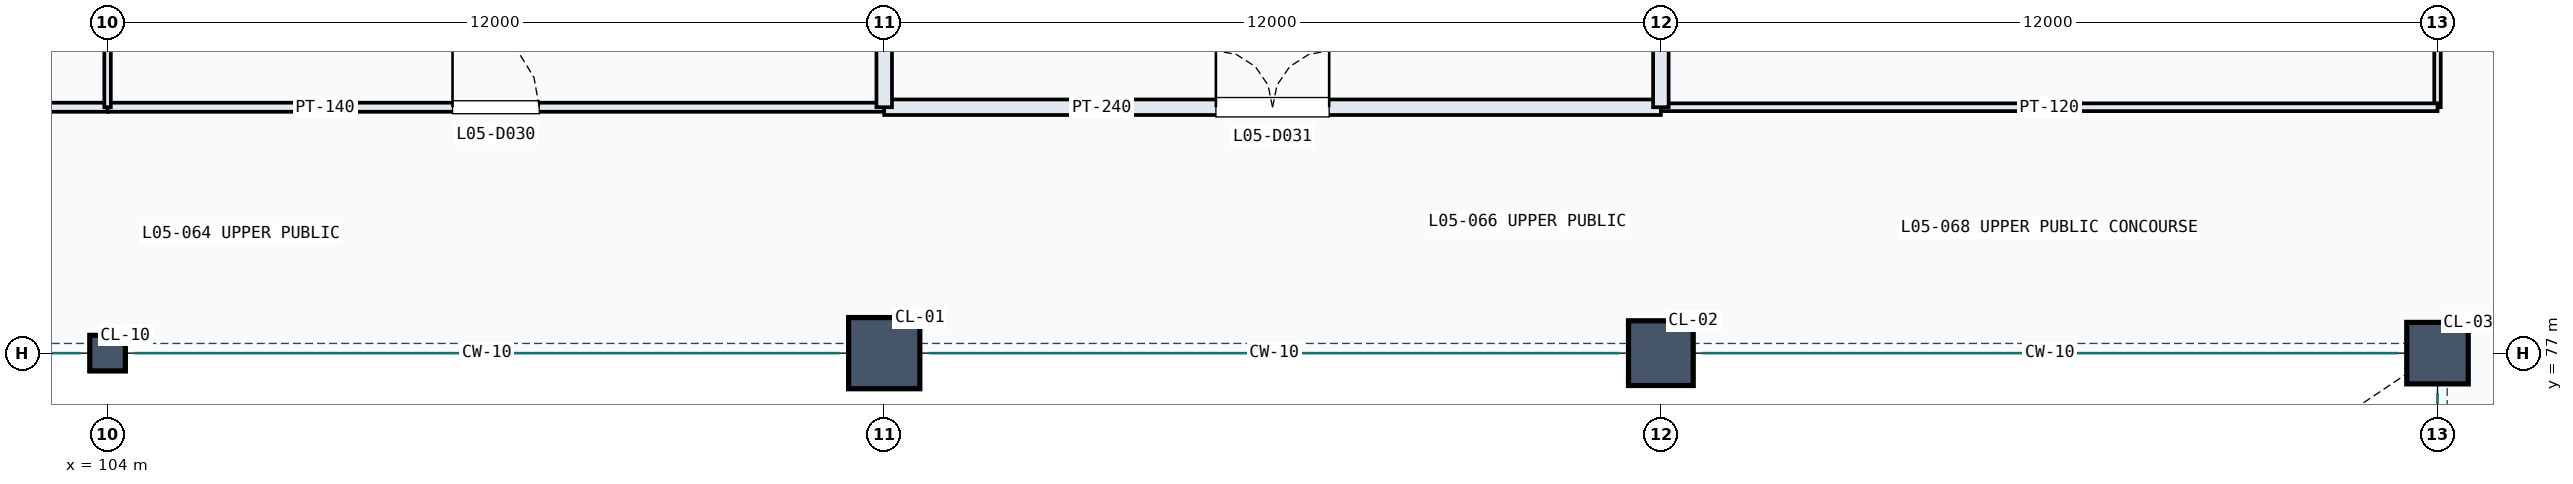
"""IFC4 building model, lengths in metres.
Left out: names, types, materials, properties, quantities, classifications, styles, units other than length and angle.
Written with IfcOpenShell. Run it as: python <this file> out.ifc"""

import sys

from ifc_helpers import new_model, si_unit, direction, frame, frame_2d, origin, origin_2d, place, context, subcontext, project, spatial, rectangle, extrude, element, fill, save


model = new_model("IFC4")
c1 = context("Model", 3, precision=1e-05, world=origin(), true_north=direction((0.0, 1.0)))
c2 = subcontext(c1, "Body", "Model", "MODEL_VIEW")
j1 = project(units=[si_unit("LENGTHUNIT", "METRE"), si_unit("PLANEANGLEUNIT", "RADIAN")], contexts=[c1])
p1 = place(None, origin())
s1 = spatial("IfcSite", under=j1, at=p1, CompositionType="ELEMENT")
p2 = place(p1, origin())
s2 = spatial("IfcBuilding", under=s1, at=p2, CompositionType="ELEMENT")
p3 = place(p2, frame((0.0, 0.0, 24.3)))
s3 = spatial("IfcBuildingStorey", under=s2, at=p3, CompositionType="ELEMENT", Elevation=24.3)
p4 = place(p3, frame((104.0, 77.0, 0.0), z_axis=(0.0, 0.0, 1.0), x_axis=(1.0, 0.0, 0.0)))
e1 = element("IfcColumn", 1, at=p4, inside=s3, PredefinedType="COLUMN", context=c2, shape_type="SweptSolid", body=[
    extrude(rectangle(XDim=0.55, YDim=0.55, at=origin_2d()), origin(), (0.0, 0.0, 1.0), 5.4),
])
p5 = place(p3, frame((116.0, 77.0, 0.0), z_axis=(0.0, 0.0, 1.0), x_axis=(1.0, 0.0, 0.0)))
e2 = element("IfcColumn", 2, at=p5, inside=s3, PredefinedType="COLUMN", context=c2, shape_type="SweptSolid", body=[
    extrude(rectangle(XDim=1.1, YDim=1.1, at=origin_2d()), origin(), (0.0, 0.0, 1.0), 5.4),
])
p6 = place(p3, frame((128.0, 77.0, 0.0), z_axis=(0.0, 0.0, 1.0), x_axis=(1.0, 0.0, 0.0)))
e3 = element("IfcColumn", 3, at=p6, inside=s3, PredefinedType="COLUMN", context=c2, shape_type="SweptSolid", body=[
    extrude(rectangle(XDim=1.0, YDim=1.0, at=origin_2d()), origin(), (0.0, 0.0, 1.0), 5.4),
])
p7 = place(p3, frame((140.0, 77.0, 0.0), z_axis=(0.0, 0.0, 1.0), x_axis=(1.0, 0.0, 0.0)))
e4 = element("IfcColumn", 4, at=p7, inside=s3, PredefinedType="COLUMN", context=c2, shape_type="SweptSolid", body=[
    extrude(rectangle(XDim=0.95, YDim=0.95, at=origin_2d()), origin(), (0.0, 0.0, 1.0), 5.4),
])
p8 = place(p3, frame((140.0, 80.8, 0.0), z_axis=(0.0, 0.0, 1.0), x_axis=(0.0, 1.0, 0.0)))
e5 = element("IfcWall", 5, at=p8, inside=s3, PredefinedType="PARTITIONING", context=c2, shape_type="SweptSolid", body=[
    extrude(rectangle(XDim=6.98, YDim=0.1, at=frame_2d((3.49, 0.0))), origin(), (0.0, 0.0, 1.0), 5.18),
])
p9 = place(p8, frame((2.515, 0.0, 0.0)))
e6 = element("IfcOpeningElement", 6, at=p9, cuts=e5, PredefinedType="OPENING", context=c2, shape_type="SweptSolid", body=[
    extrude(rectangle(XDim=1.95, YDim=2.4, at=frame_2d((0.975, 1.2))), frame((0.0, 0.06, 0.0), z_axis=(0.0, -1.0, 0.0), x_axis=(1.0, 0.0, 0.0)), (0.0, 0.0, 1.0), 0.12),
])
p10 = place(p3, frame((94.0, 80.8, 0.0), z_axis=(0.0, 0.0, 1.0), x_axis=(1.0, 0.0, 0.0)))
e7 = element("IfcWall", 7, at=p10, inside=s3, PredefinedType="PARTITIONING", context=c2, shape_type="SweptSolid", body=[
    extrude(rectangle(XDim=10.0, YDim=0.14, at=frame_2d((5.0, 0.0))), origin(), (0.0, 0.0, 1.0), 5.18),
])
p11 = place(p10, frame((4.19, 0.0, 0.0)))
e8 = element("IfcOpeningElement", 8, at=p11, cuts=e7, PredefinedType="OPENING", context=c2, shape_type="SweptSolid", body=[
    extrude(rectangle(XDim=1.62, YDim=2.25, at=frame_2d((0.81, 1.125))), frame((0.0, 0.08, 0.0), z_axis=(0.0, -1.0, 0.0), x_axis=(1.0, 0.0, 0.0)), (0.0, 0.0, 1.0), 0.16),
])
p12 = place(p3, frame((104.0, 80.8, 0.0), z_axis=(0.0, 0.0, 1.0), x_axis=(1.0, 0.0, 0.0)))
e9 = element("IfcWall", 9, at=p12, inside=s3, PredefinedType="PARTITIONING", context=c2, shape_type="SweptSolid", body=[
    extrude(rectangle(XDim=12.0, YDim=0.14, at=frame_2d((6.0, 0.0))), origin(), (0.0, 0.0, 1.0), 5.18),
])
p13 = place(p12, frame((5.33, 0.0, 0.0)))
e10 = element("IfcOpeningElement", 10, at=p13, cuts=e9, PredefinedType="OPENING", context=c2, shape_type="SweptSolid", body=[
    extrude(rectangle(XDim=1.34, YDim=2.15, at=frame_2d((0.67, 1.075))), frame((0.0, 0.08, 0.0), z_axis=(0.0, -1.0, 0.0), x_axis=(1.0, 0.0, 0.0)), (0.0, 0.0, 1.0), 0.16),
])
p14 = place(p3, frame((116.0, 80.8, 0.0), z_axis=(0.0, 0.0, 1.0), x_axis=(1.0, 0.0, 0.0)))
e11 = element("IfcWall", 11, at=p14, inside=s3, PredefinedType="PARTITIONING", context=c2, shape_type="SweptSolid", body=[
    extrude(rectangle(XDim=12.0, YDim=0.24, at=frame_2d((6.0, 0.0))), origin(), (0.0, 0.0, 1.0), 5.18),
])
p15 = place(p14, frame((5.125, 0.0, 0.0)))
e12 = element("IfcOpeningElement", 12, at=p15, cuts=e11, PredefinedType="OPENING", context=c2, shape_type="SweptSolid", body=[
    extrude(rectangle(XDim=1.75, YDim=2.25, at=frame_2d((0.875, 1.125))), frame((0.0, 0.13, 0.0), z_axis=(0.0, -1.0, 0.0), x_axis=(1.0, 0.0, 0.0)), (0.0, 0.0, 1.0), 0.26),
])
p16 = place(p3, frame((128.0, 80.8, 0.0), z_axis=(0.0, 0.0, 1.0), x_axis=(1.0, 0.0, 0.0)))
e13 = element("IfcWall", 13, at=p16, inside=s3, PredefinedType="PARTITIONING", context=c2, shape_type="SweptSolid", body=[
    extrude(rectangle(XDim=12.0, YDim=0.12, at=frame_2d((6.0, 0.0))), origin(), (0.0, 0.0, 1.0), 5.18),
])
p17 = place(p3, frame((104.0, 80.8, 0.0), z_axis=(0.0, 0.0, 1.0), x_axis=(0.0, 1.0, 0.0)))
e14 = element("IfcWall", 14, at=p17, inside=s3, PredefinedType="PARTITIONING", context=c2, shape_type="SweptSolid", body=[
    extrude(rectangle(XDim=14.015, YDim=0.1, at=frame_2d((7.008, 0.0))), origin(), (0.0, 0.0, 1.0), 5.18),
])
p18 = place(p3, frame((116.0, 80.8, 0.0), z_axis=(0.0, 0.0, 1.0), x_axis=(0.0, 1.0, 0.0)))
e15 = element("IfcWall", 15, at=p18, inside=s3, PredefinedType="PARTITIONING", context=c2, shape_type="SweptSolid", body=[
    extrude(rectangle(XDim=15.184, YDim=0.24, at=frame_2d((7.592, 0.0))), origin(), (0.0, 0.0, 1.0), 5.18),
])
p19 = place(p3, frame((128.0, 80.8, 0.0), z_axis=(0.0, 0.0, 1.0), x_axis=(0.0, 1.0, 0.0)))
e16 = element("IfcWall", 16, at=p19, inside=s3, PredefinedType="PARTITIONING", context=c2, shape_type="SweptSolid", body=[
    extrude(rectangle(XDim=14.488, YDim=0.24, at=frame_2d((7.244, 0.0))), origin(), (0.0, 0.0, 1.0), 5.18),
])
p20 = place(p13, origin())
e17 = element("IfcDoor", 17, at=p20, inside=s3, OperationType="SINGLE_SWING_LEFT", PredefinedType="DOOR", context=c2, shape_type="SweptSolid", body=[
    extrude(rectangle(XDim=1.34, YDim=2.15, at=frame_2d((0.67, 1.075))), frame((0.0, 0.025, 0.0), z_axis=(0.0, -1.0, 0.0), x_axis=(1.0, 0.0, 0.0)), (0.0, 0.0, 1.0), 0.05),
])
fill(e10, e17)
p21 = place(p15, origin())
e18 = element("IfcDoor", 18, at=p21, inside=s3, OperationType="DOUBLE_DOOR_SINGLE_SWING", PredefinedType="DOOR", context=c2, shape_type="SweptSolid", body=[
    extrude(rectangle(XDim=1.75, YDim=2.25, at=frame_2d((0.875, 1.125))), frame((0.0, 0.025, 0.0), z_axis=(0.0, -1.0, 0.0), x_axis=(1.0, 0.0, 0.0)), (0.0, 0.0, 1.0), 0.05),
])
fill(e12, e18)
save(model, sys.argv[1])
